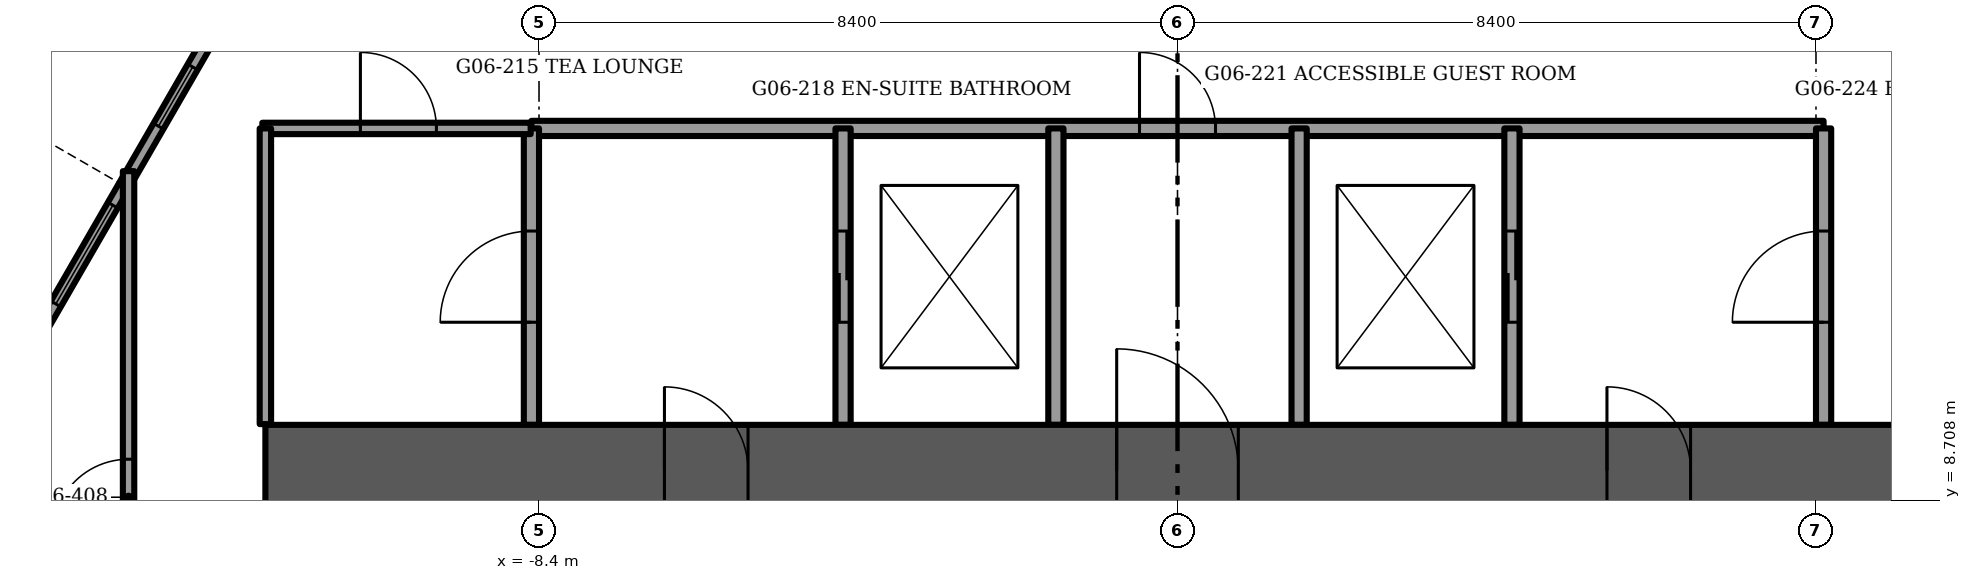
"""IFC4 building model, lengths in metres.
Left out: names, types, materials, properties, quantities, classifications, styles, units other than length and angle.
Written with IfcOpenShell. Run it as: python <this file> out.ifc"""

import sys

from ifc_helpers import new_model, si_unit, direction, frame, frame_2d, origin, place, context, subcontext, project, spatial, rectangle, extrude, element, fill, save


model = new_model("IFC4")
c1 = context("Model", 3, precision=1e-05, world=origin(), true_north=direction((0.0, 1.0)))
c2 = subcontext(c1, "Body", "Model", "MODEL_VIEW")
j1 = project(units=[si_unit("LENGTHUNIT", "METRE"), si_unit("PLANEANGLEUNIT", "RADIAN")], contexts=[c1])
p1 = place(None, origin())
s1 = spatial("IfcSite", under=j1, at=p1, CompositionType="ELEMENT")
p2 = place(p1, origin())
s2 = spatial("IfcBuilding", under=s1, at=p2, CompositionType="ELEMENT")
p3 = place(p2, frame((0.0, 0.0, 28.0)))
s3 = spatial("IfcBuildingStorey", under=s2, at=p3, CompositionType="ELEMENT", Elevation=28.0)
p4 = place(p3, frame((-12.0, 9.1, -0.3), z_axis=(0.0, 0.0, 1.0), x_axis=(1.0, 0.0, 0.0)))
e1 = element("IfcWall", 1, at=p4, inside=s3, PredefinedType="SHEAR", context=c2, shape_type="SweptSolid", body=[
    extrude(rectangle(XDim=24.0, YDim=1.2, at=frame_2d((12.0, 0.0))), origin(), (0.0, 0.0, 1.0), 3.75),
])
p5 = place(p4, frame((11.2, 0.0, 0.0)))
e2 = element("IfcOpeningElement", 2, at=p5, cuts=e1, PredefinedType="OPENING", context=c2, shape_type="SweptSolid", body=[
    extrude(rectangle(XDim=1.6, YDim=2.1, at=frame_2d((0.8, 1.05))), frame((0.0, 0.6, 0.0), z_axis=(0.0, -1.0, 0.0), x_axis=(1.0, 0.0, 0.0)), (0.0, 0.0, 1.0), 1.2),
])
p6 = place(p4, frame((5.25, 0.0, 0.0)))
e3 = element("IfcOpeningElement", 3, at=p6, cuts=e1, PredefinedType="OPENING", context=c2, shape_type="SweptSolid", body=[
    extrude(rectangle(XDim=1.1, YDim=2.1, at=frame_2d((0.55, 1.05))), frame((0.0, 0.6, 0.0), z_axis=(0.0, -1.0, 0.0), x_axis=(1.0, 0.0, 0.0)), (0.0, 0.0, 1.0), 1.2),
])
p7 = place(p4, frame((17.65, 0.0, 0.0)))
e4 = element("IfcOpeningElement", 4, at=p7, cuts=e1, PredefinedType="OPENING", context=c2, shape_type="SweptSolid", body=[
    extrude(rectangle(XDim=1.1, YDim=2.1, at=frame_2d((0.55, 1.05))), frame((0.0, 0.6, 0.0), z_axis=(0.0, -1.0, 0.0), x_axis=(1.0, 0.0, 0.0)), (0.0, 0.0, 1.0), 1.2),
])
p8 = place(p3, frame((-9.56, 20.292, 0.0), z_axis=(0.0, 0.0, 1.0), x_axis=(-0.500000010132, -0.866025397935, 0.0)))
e5 = element("IfcWall", 5, at=p8, inside=s3, PredefinedType="SOLIDWALL", context=c2, shape_type="SweptSolid", body=[
    extrude(rectangle(XDim=22.817, YDim=0.15, at=frame_2d((11.408, 0.0))), origin(), (0.0, 0.0, 1.0), 3.45),
])
p9 = place(p8, frame((2.594, 0.0, 0.15)))
e6 = element("IfcOpeningElement", 6, at=p9, cuts=e5, PredefinedType="OPENING", context=c2, shape_type="SweptSolid", body=[
    extrude(rectangle(XDim=0.9, YDim=2.85, at=frame_2d((0.45, 1.425))), frame((0.0, 0.075, 0.0), z_axis=(0.0, -1.0, 0.0), x_axis=(1.0, 0.0, 0.0)), (0.0, 0.0, 1.0), 0.15),
])
p10 = place(p8, frame((3.825, 0.0, 0.15)))
e7 = element("IfcOpeningElement", 7, at=p10, cuts=e5, PredefinedType="OPENING", context=c2, shape_type="SweptSolid", body=[
    extrude(rectangle(XDim=1.5, YDim=2.85, at=frame_2d((0.75, 1.425))), frame((0.0, 0.075, 0.0), z_axis=(0.0, -1.0, 0.0), x_axis=(1.0, 0.0, 0.0)), (0.0, 0.0, 1.0), 0.15),
])
p11 = place(p8, frame((6.794, 0.0, 0.15)))
e8 = element("IfcOpeningElement", 8, at=p11, cuts=e5, PredefinedType="OPENING", context=c2, shape_type="SweptSolid", body=[
    extrude(rectangle(XDim=0.9, YDim=2.85, at=frame_2d((0.45, 1.425))), frame((0.0, 0.075, 0.0), z_axis=(0.0, -1.0, 0.0), x_axis=(1.0, 0.0, 0.0)), (0.0, 0.0, 1.0), 0.15),
])
p12 = place(p8, frame((8.894, 0.0, 0.15)))
e9 = element("IfcOpeningElement", 9, at=p12, cuts=e5, PredefinedType="OPENING", context=c2, shape_type="SweptSolid", body=[
    extrude(rectangle(XDim=1.5, YDim=2.85, at=frame_2d((0.75, 1.425))), frame((0.0, 0.075, 0.0), z_axis=(0.0, -1.0, 0.0), x_axis=(1.0, 0.0, 0.0)), (0.0, 0.0, 1.0), 0.15),
])
p13 = place(p8, frame((10.994, 0.0, 0.15)))
e10 = element("IfcOpeningElement", 10, at=p13, cuts=e5, PredefinedType="OPENING", context=c2, shape_type="SweptSolid", body=[
    extrude(rectangle(XDim=1.8, YDim=2.85, at=frame_2d((0.9, 1.425))), frame((0.0, 0.075, 0.0), z_axis=(0.0, -1.0, 0.0), x_axis=(1.0, 0.0, 0.0)), (0.0, 0.0, 1.0), 0.15),
])
p14 = place(p8, frame((13.094, 0.0, 0.15)))
e11 = element("IfcOpeningElement", 11, at=p14, cuts=e5, PredefinedType="OPENING", context=c2, shape_type="SweptSolid", body=[
    extrude(rectangle(XDim=1.5, YDim=2.85, at=frame_2d((0.75, 1.425))), frame((0.0, 0.075, 0.0), z_axis=(0.0, -1.0, 0.0), x_axis=(1.0, 0.0, 0.0)), (0.0, 0.0, 1.0), 0.15),
])
p15 = place(p8, frame((15.631, 0.0, 0.0)))
e12 = element("IfcOpeningElement", 12, at=p15, cuts=e5, PredefinedType="OPENING", context=c2, shape_type="SweptSolid", body=[
    extrude(rectangle(XDim=1.5, YDim=2.4, at=frame_2d((0.75, 1.2))), frame((0.0, 0.075, 0.0), z_axis=(0.0, -1.0, 0.0), x_axis=(1.0, 0.0, 0.0)), (0.0, 0.0, 1.0), 0.15),
])
p16 = place(p8, frame((0.44, 0.0, 0.15)))
e13 = element("IfcOpeningElement", 13, at=p16, cuts=e5, PredefinedType="OPENING", context=c2, shape_type="SweptSolid", body=[
    extrude(rectangle(XDim=0.9, YDim=2.73, at=frame_2d((0.45, 1.365))), frame((0.0, 0.075, 0.0), z_axis=(0.0, -1.0, 0.0), x_axis=(1.0, 0.0, 0.0)), (0.0, 0.0, 1.0), 0.15),
])
p17 = place(p8, frame((20.024, 0.0, 0.15)))
e14 = element("IfcOpeningElement", 14, at=p17, cuts=e5, PredefinedType="OPENING", context=c2, shape_type="SweptSolid", body=[
    extrude(rectangle(XDim=1.8, YDim=2.73, at=frame_2d((0.9, 1.365))), frame((0.0, 0.075, 0.0), z_axis=(0.0, -1.0, 0.0), x_axis=(1.0, 0.0, 0.0)), (0.0, 0.0, 1.0), 0.15),
])
p18 = place(p3, frame((-8.5, 13.6, 0.0), z_axis=(0.0, 0.0, 1.0), x_axis=(1.0, 0.0, 0.0)))
e15 = element("IfcWall", 15, at=p18, inside=s3, PredefinedType="PARTITIONING", context=c2, shape_type="SweptSolid", body=[
    extrude(rectangle(XDim=17.0, YDim=0.2, at=frame_2d((8.5, 0.0))), origin(), (0.0, 0.0, 1.0), 3.45),
])
p19 = place(p18, frame((8.0, 0.0, 0.0)))
e16 = element("IfcOpeningElement", 16, at=p19, cuts=e15, PredefinedType="OPENING", context=c2, shape_type="SweptSolid", body=[
    extrude(rectangle(XDim=1.0, YDim=2.1, at=frame_2d((0.5, 1.05))), frame((0.0, 0.1, 0.0), z_axis=(0.0, -1.0, 0.0), x_axis=(1.0, 0.0, 0.0)), (0.0, 0.0, 1.0), 0.2),
])
p20 = place(p3, frame((-8.5, 9.7, 0.0), z_axis=(0.0, 0.0, 1.0), x_axis=(0.0, 1.0, 0.0)))
e17 = element("IfcWall", 17, at=p20, inside=s3, PredefinedType="PARTITIONING", context=c2, shape_type="SweptSolid", body=[
    extrude(rectangle(XDim=3.9, YDim=0.2, at=frame_2d((1.95, 0.0))), origin(), (0.0, 0.0, 1.0), 3.45),
])
p21 = place(p20, frame((1.35, 0.0, 0.0)))
e18 = element("IfcOpeningElement", 18, at=p21, cuts=e17, PredefinedType="OPENING", context=c2, shape_type="SweptSolid", body=[
    extrude(rectangle(XDim=1.2, YDim=2.1, at=frame_2d((0.6, 1.05))), frame((0.0, 0.1, 0.0), z_axis=(0.0, -1.0, 0.0), x_axis=(1.0, 0.0, 0.0)), (0.0, 0.0, 1.0), 0.2),
])
p22 = place(p3, frame((8.5, 9.7, 0.0), z_axis=(0.0, 0.0, 1.0), x_axis=(0.0, 1.0, 0.0)))
e19 = element("IfcWall", 19, at=p22, inside=s3, PredefinedType="PARTITIONING", context=c2, shape_type="SweptSolid", body=[
    extrude(rectangle(XDim=3.9, YDim=0.2, at=frame_2d((1.95, 0.0))), origin(), (0.0, 0.0, 1.0), 3.45),
])
p23 = place(p22, frame((1.35, 0.0, 0.0)))
e20 = element("IfcOpeningElement", 20, at=p23, cuts=e19, PredefinedType="OPENING", context=c2, shape_type="SweptSolid", body=[
    extrude(rectangle(XDim=1.2, YDim=2.1, at=frame_2d((0.6, 1.05))), frame((0.0, 0.1, 0.0), z_axis=(0.0, -1.0, 0.0), x_axis=(1.0, 0.0, 0.0)), (0.0, 0.0, 1.0), 0.2),
])
p24 = place(p3, frame((-4.4, 9.7, 0.0), z_axis=(0.0, 0.0, 1.0), x_axis=(0.0, 1.0, 0.0)))
e21 = element("IfcWall", 21, at=p24, inside=s3, PredefinedType="PARTITIONING", context=c2, shape_type="SweptSolid", body=[
    extrude(rectangle(XDim=3.9, YDim=0.2, at=frame_2d((1.95, 0.0))), origin(), (0.0, 0.0, 1.0), 3.45),
])
p25 = place(p24, frame((1.35, 0.0, 0.0)))
e22 = element("IfcOpeningElement", 22, at=p25, cuts=e21, PredefinedType="OPENING", context=c2, shape_type="SweptSolid", body=[
    extrude(rectangle(XDim=1.2, YDim=2.1, at=frame_2d((0.6, 1.05))), frame((0.0, 0.1, 0.0), z_axis=(0.0, -1.0, 0.0), x_axis=(1.0, 0.0, 0.0)), (0.0, 0.0, 1.0), 0.2),
])
p26 = place(p3, frame((4.4, 9.7, 0.0), z_axis=(0.0, 0.0, 1.0), x_axis=(0.0, 1.0, 0.0)))
e23 = element("IfcWall", 23, at=p26, inside=s3, PredefinedType="PARTITIONING", context=c2, shape_type="SweptSolid", body=[
    extrude(rectangle(XDim=3.9, YDim=0.2, at=frame_2d((1.95, 0.0))), origin(), (0.0, 0.0, 1.0), 3.45),
])
p27 = place(p26, frame((1.35, 0.0, 0.0)))
e24 = element("IfcOpeningElement", 24, at=p27, cuts=e23, PredefinedType="OPENING", context=c2, shape_type="SweptSolid", body=[
    extrude(rectangle(XDim=1.2, YDim=2.1, at=frame_2d((0.6, 1.05))), frame((0.0, 0.1, 0.0), z_axis=(0.0, -1.0, 0.0), x_axis=(1.0, 0.0, 0.0)), (0.0, 0.0, 1.0), 0.2),
])
for number, where, z_axis, x_axis in (
    (25, (-1.6, 9.7, 0.0), (0.0, 0.0, 1.0), (0.0, 1.0, 0.0)),
    (26, (1.6, 9.7, 0.0), (0.0, 0.0, 1.0), (0.0, 1.0, 0.0)),
):
    element("IfcWall", number, at=place(p3, frame(where, z_axis=z_axis, x_axis=x_axis)), inside=s3, PredefinedType="PARTITIONING", context=c2, shape_type="SweptSolid", body=[
        extrude(rectangle(XDim=3.9, YDim=0.2, at=frame_2d((1.95, 0.0))), origin(), (0.0, 0.0, 1.0), 3.45),
    ])
p28 = place(p3, frame((-12.04, 13.6, 0.0), z_axis=(0.0, 0.0, 1.0), x_axis=(1.0, 0.0, 0.0)))
e27 = element("IfcWall", 27, at=p28, inside=s3, PredefinedType="PARTITIONING", context=c2, shape_type="SweptSolid", body=[
    extrude(rectangle(XDim=3.53, YDim=0.15, at=frame_2d((1.765, 0.0))), origin(), (0.0, 0.0, 1.0), 3.45),
])
p29 = place(p28, frame((1.29, 0.0, 0.0)))
e28 = element("IfcOpeningElement", 28, at=p29, cuts=e27, PredefinedType="OPENING", context=c2, shape_type="SweptSolid", body=[
    extrude(rectangle(XDim=1.0, YDim=2.1, at=frame_2d((0.5, 1.05))), frame((0.0, 0.075, 0.0), z_axis=(0.0, -1.0, 0.0), x_axis=(1.0, 0.0, 0.0)), (0.0, 0.0, 1.0), 0.15),
])
p30 = place(p3, frame((-12.0, 9.71, 0.0), z_axis=(0.0, 0.0, 1.0), x_axis=(0.0, 1.0, 0.0)))
e29 = element("IfcWall", 29, at=p30, inside=s3, PredefinedType="PARTITIONING", context=c2, shape_type="SweptSolid", body=[
    extrude(rectangle(XDim=3.89, YDim=0.15, at=frame_2d((1.945, 0.0))), origin(), (0.0, 0.0, 1.0), 3.45),
])
p31 = place(p3, frame((-13.8, -3.7, 0.0), z_axis=(0.0, 0.0, 1.0), x_axis=(0.0, 1.0, 0.0)))
e30 = element("IfcWall", 30, at=p31, inside=s3, PredefinedType="PARTITIONING", context=c2, shape_type="SweptSolid", body=[
    extrude(rectangle(XDim=16.738, YDim=0.15, at=frame_2d((8.369, 0.0))), origin(), (0.0, 0.0, 1.0), 3.45),
])
p32 = place(p31, frame((5.8, 0.0, 0.0)))
e31 = element("IfcOpeningElement", 31, at=p32, cuts=e30, PredefinedType="OPENING", context=c2, shape_type="SweptSolid", body=[
    extrude(rectangle(XDim=1.0, YDim=2.1, at=frame_2d((0.5, 1.05))), frame((0.0, 0.075, 0.0), z_axis=(0.0, -1.0, 0.0), x_axis=(1.0, 0.0, 0.0)), (0.0, 0.0, 1.0), 0.15),
])
p33 = place(p31, frame((11.948, 0.0, 0.0)))
e32 = element("IfcOpeningElement", 32, at=p33, cuts=e30, PredefinedType="OPENING", context=c2, shape_type="SweptSolid", body=[
    extrude(rectangle(XDim=1.0, YDim=2.1, at=frame_2d((0.5, 1.05))), frame((0.0, 0.075, 0.0), z_axis=(0.0, -1.0, 0.0), x_axis=(1.0, 0.0, 0.0)), (0.0, 0.0, 1.0), 0.15),
])
p34 = place(p11, origin())
e33 = element("IfcWindow", 33, at=p34, inside=s3, PartitioningType="SINGLE_PANEL", PredefinedType="WINDOW", context=c2, shape_type="SweptSolid", body=[
    extrude(rectangle(XDim=0.9, YDim=2.85, at=frame_2d((0.45, 1.425))), frame((0.0, 0.03, 0.0), z_axis=(0.0, -1.0, 0.0), x_axis=(1.0, 0.0, 0.0)), (0.0, 0.0, 1.0), 0.06),
])
fill(e8, e33)
p35 = place(p12, origin())
e34 = element("IfcWindow", 34, at=p35, inside=s3, PartitioningType="SINGLE_PANEL", PredefinedType="WINDOW", context=c2, shape_type="SweptSolid", body=[
    extrude(rectangle(XDim=1.5, YDim=2.85, at=frame_2d((0.75, 1.425))), frame((0.0, 0.03, 0.0), z_axis=(0.0, -1.0, 0.0), x_axis=(1.0, 0.0, 0.0)), (0.0, 0.0, 1.0), 0.06),
])
fill(e9, e34)
p36 = place(p5, origin())
e35 = element("IfcDoor", 35, at=p36, inside=s3, OperationType="DOUBLE_DOOR_SINGLE_SWING", PredefinedType="DOOR", context=c2, shape_type="SweptSolid", body=[
    extrude(rectangle(XDim=1.6, YDim=2.1, at=frame_2d((0.8, 1.05))), frame((0.0, 0.025, 0.0), z_axis=(0.0, -1.0, 0.0), x_axis=(1.0, 0.0, 0.0)), (0.0, 0.0, 1.0), 0.05),
])
fill(e2, e35)
p37 = place(p6, origin())
e36 = element("IfcDoor", 36, at=p37, inside=s3, OperationType="SINGLE_SWING_LEFT", PredefinedType="DOOR", context=c2, shape_type="SweptSolid", body=[
    extrude(rectangle(XDim=1.1, YDim=2.1, at=frame_2d((0.55, 1.05))), frame((0.0, 0.025, 0.0), z_axis=(0.0, -1.0, 0.0), x_axis=(1.0, 0.0, 0.0)), (0.0, 0.0, 1.0), 0.05),
])
fill(e3, e36)
p38 = place(p7, origin())
e37 = element("IfcDoor", 37, at=p38, inside=s3, OperationType="SINGLE_SWING_RIGHT", PredefinedType="DOOR", context=c2, shape_type="SweptSolid", body=[
    extrude(rectangle(XDim=1.1, YDim=2.1, at=frame_2d((0.55, 1.05))), frame((0.0, 0.025, 0.0), z_axis=(0.0, -1.0, 0.0), x_axis=(1.0, 0.0, 0.0)), (0.0, 0.0, 1.0), 0.05),
])
fill(e4, e37)
p39 = place(p25, origin())
e38 = element("IfcDoor", 38, at=p39, inside=s3, OperationType="SLIDING_TO_LEFT", PredefinedType="DOOR", context=c2, shape_type="SweptSolid", body=[
    extrude(rectangle(XDim=1.2, YDim=2.1, at=frame_2d((0.6, 1.05))), frame((0.0, 0.025, 0.0), z_axis=(0.0, -1.0, 0.0), x_axis=(1.0, 0.0, 0.0)), (0.0, 0.0, 1.0), 0.05),
])
fill(e22, e38)
p40 = place(p21, origin())
e39 = element("IfcDoor", 39, at=p40, inside=s3, OperationType="SINGLE_SWING_LEFT", PredefinedType="DOOR", context=c2, shape_type="SweptSolid", body=[
    extrude(rectangle(XDim=1.2, YDim=2.1, at=frame_2d((0.6, 1.05))), frame((0.0, 0.025, 0.0), z_axis=(0.0, -1.0, 0.0), x_axis=(1.0, 0.0, 0.0)), (0.0, 0.0, 1.0), 0.05),
])
fill(e18, e39)
p41 = place(p27, origin())
e40 = element("IfcDoor", 40, at=p41, inside=s3, OperationType="SLIDING_TO_LEFT", PredefinedType="DOOR", context=c2, shape_type="SweptSolid", body=[
    extrude(rectangle(XDim=1.2, YDim=2.1, at=frame_2d((0.6, 1.05))), frame((0.0, 0.025, 0.0), z_axis=(0.0, -1.0, 0.0), x_axis=(1.0, 0.0, 0.0)), (0.0, 0.0, 1.0), 0.05),
])
fill(e24, e40)
p42 = place(p23, origin())
e41 = element("IfcDoor", 41, at=p42, inside=s3, OperationType="SINGLE_SWING_LEFT", PredefinedType="DOOR", context=c2, shape_type="SweptSolid", body=[
    extrude(rectangle(XDim=1.2, YDim=2.1, at=frame_2d((0.6, 1.05))), frame((0.0, 0.025, 0.0), z_axis=(0.0, -1.0, 0.0), x_axis=(1.0, 0.0, 0.0)), (0.0, 0.0, 1.0), 0.05),
])
fill(e20, e41)
p43 = place(p19, origin())
e42 = element("IfcDoor", 42, at=p43, inside=s3, OperationType="SINGLE_SWING_LEFT", PredefinedType="DOOR", context=c2, shape_type="SweptSolid", body=[
    extrude(rectangle(XDim=1.0, YDim=2.1, at=frame_2d((0.5, 1.05))), frame((0.0, 0.025, 0.0), z_axis=(0.0, -1.0, 0.0), x_axis=(1.0, 0.0, 0.0)), (0.0, 0.0, 1.0), 0.05),
])
fill(e16, e42)
p44 = place(p33, origin())
e43 = element("IfcDoor", 43, at=p44, inside=s3, OperationType="SINGLE_SWING_LEFT", PredefinedType="DOOR", context=c2, shape_type="SweptSolid", body=[
    extrude(rectangle(XDim=1.0, YDim=2.1, at=frame_2d((0.5, 1.05))), frame((0.0, 0.025, 0.0), z_axis=(0.0, -1.0, 0.0), x_axis=(1.0, 0.0, 0.0)), (0.0, 0.0, 1.0), 0.05),
])
fill(e32, e43)
p45 = place(p29, origin())
e44 = element("IfcDoor", 44, at=p45, inside=s3, OperationType="SINGLE_SWING_RIGHT", PredefinedType="DOOR", context=c2, shape_type="SweptSolid", body=[
    extrude(rectangle(XDim=1.0, YDim=2.1, at=frame_2d((0.5, 1.05))), frame((0.0, 0.025, 0.0), z_axis=(0.0, -1.0, 0.0), x_axis=(1.0, 0.0, 0.0)), (0.0, 0.0, 1.0), 0.05),
])
fill(e28, e44)
save(model, sys.argv[1])
